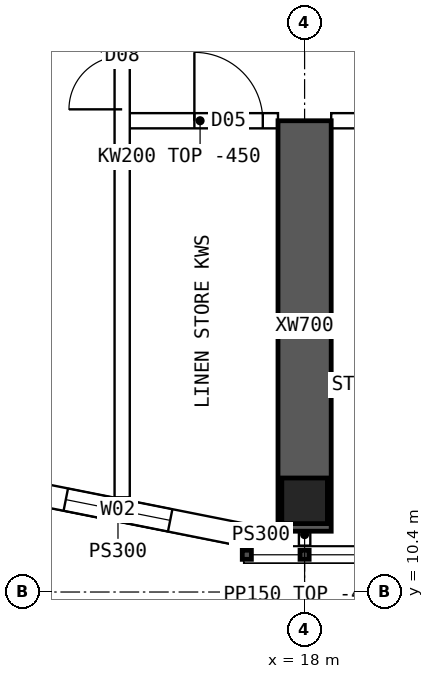
"""IFC4 building model, lengths in metres.
Left out: names, types, materials, properties, quantities, classifications, styles, units other than length and angle.
Written with IfcOpenShell. Run it as: python <this file> out.ifc"""

import sys

from ifc_helpers import new_model, si_unit, direction, frame, frame_2d, origin, origin_2d, place, context, subcontext, project, spatial, polyline, rectangle, hollow_rectangle, outline, extrude, element, fill, save


model = new_model("IFC4")
c1 = context("Model", 3, precision=1e-05, world=origin(), true_north=direction((0.0, 1.0)))
c2 = subcontext(c1, "Body", "Model", "MODEL_VIEW")
j1 = project(units=[si_unit("LENGTHUNIT", "METRE"), si_unit("PLANEANGLEUNIT", "RADIAN")], contexts=[c1])
p1 = place(None, origin())
s1 = spatial("IfcSite", under=j1, at=p1, CompositionType="ELEMENT")
p2 = place(p1, origin())
s2 = spatial("IfcBuilding", under=s1, at=p2, CompositionType="ELEMENT")
p3 = place(p2, frame((0.0, 0.0, 227.8)))
s3 = spatial("IfcBuildingStorey", under=s2, at=p3, CompositionType="ELEMENT", Elevation=227.8)
p4 = place(p3, frame((18.0, 11.6, 0.0), z_axis=(0.0, 0.0, 1.0), x_axis=(1.0, 0.0, 0.0)))
e1 = element("IfcColumn", 1, at=p4, inside=s3, PredefinedType="COLUMN", context=c2, shape_type="SweptSolid", body=[
    extrude(hollow_rectangle(XDim=0.6, YDim=0.6, WallThickness=0.06, at=origin_2d()), origin(), (0.0, 0.0, 1.0), 3.75),
])
p5 = place(p3, frame((18.0, 11.2, 0.0), z_axis=(0.0, 0.0, 1.0), x_axis=(0.0, 1.0, 0.0)))
e2 = element("IfcWall", 2, at=p5, inside=s3, PredefinedType="SHEAR", context=c2, shape_type="SweptSolid", body=[
    extrude(rectangle(XDim=5.4, YDim=0.7, at=frame_2d((2.7, 0.0))), origin(), (0.0, 0.0, 1.0), 3.75),
])
p6 = place(p3, frame((13.89, 11.808, 0.0), z_axis=(0.0, 0.0, 1.0), x_axis=(0.98078325777, -0.195100490205, 0.0)))
e3 = element("IfcWall", 3, at=p6, inside=s3, PredefinedType="SOLIDWALL", context=c2, shape_type="SweptSolid", body=[
    extrude(outline(polyline([(-0.03, -0.15), (3.405, -0.15), (3.345, 0.15), (0.03, 0.15), (-0.03, -0.15)])), origin(), (0.0, 0.0, 1.0), 3.3),
])
p7 = place(p6, frame((0.988, 0.0, 0.9)))
e4 = element("IfcOpeningElement", 4, at=p7, cuts=e3, PredefinedType="OPENING", context=c2, shape_type="SweptSolid", body=[
    extrude(rectangle(XDim=1.4, YDim=1.8, at=frame_2d((0.7, 0.9))), frame((0.0, 0.16, 0.0), z_axis=(0.0, -1.0, 0.0), x_axis=(1.0, 0.0, 0.0)), (0.0, 0.0, 1.0), 0.32),
])
p8 = place(p3, frame((17.2, 11.15, 0.0), z_axis=(0.0, 0.0, 1.0), x_axis=(1.0, 0.0, 0.0)))
e5 = element("IfcWall", 5, at=p8, inside=s3, PredefinedType="SOLIDWALL", context=c2, shape_type="SweptSolid", body=[
    extrude(rectangle(XDim=0.45, YDim=0.3, at=frame_2d((0.225, 0.0))), origin(), (0.0, 0.0, 1.0), 3.3),
])
p9 = place(p3, frame((15.6, 16.6, 0.0), z_axis=(0.0, 0.0, 1.0), x_axis=(1.0, 0.0, 0.0)))
e6 = element("IfcWall", 6, at=p9, inside=s3, PredefinedType="SOLIDWALL", context=c2, shape_type="SweptSolid", body=[
    extrude(rectangle(XDim=2.05, YDim=0.2, at=frame_2d((1.025, 0.0))), origin(), (0.0, 0.0, 1.0), 3.3),
])
p10 = place(p9, frame((0.95, 0.0, 0.0)))
e7 = element("IfcOpeningElement", 7, at=p10, cuts=e6, PredefinedType="OPENING", context=c2, shape_type="SweptSolid", body=[
    extrude(rectangle(XDim=0.9, YDim=2.1, at=frame_2d((0.45, 1.05))), frame((0.0, 0.11, 0.0), z_axis=(0.0, -1.0, 0.0), x_axis=(1.0, 0.0, 0.0)), (0.0, 0.0, 1.0), 0.22),
])
p11 = place(p3, frame((18.35, 16.6, 0.0), z_axis=(0.0, 0.0, 1.0), x_axis=(1.0, 0.0, 0.0)))
e8 = element("IfcWall", 8, at=p11, inside=s3, PredefinedType="SOLIDWALL", context=c2, shape_type="SweptSolid", body=[
    extrude(outline(polyline([(0.0, 0.0), (5.3, 0.0), (5.3, 2.9), (0.0, 2.9), (0.0, 0.0)])), frame((0.0, 0.1, 0.0), z_axis=(0.0, -1.0, 0.0), x_axis=(1.0, 0.0, 0.0)), (0.0, 0.0, 1.0), 0.2),
])
p12 = place(p11, frame((2.3, 0.0, 0.0)))
e9 = element("IfcOpeningElement", 9, at=p12, cuts=e8, PredefinedType="OPENING", context=c2, shape_type="SweptSolid", body=[
    extrude(rectangle(XDim=0.9, YDim=2.1, at=frame_2d((0.45, 1.05))), frame((0.0, 0.11, 0.0), z_axis=(0.0, -1.0, 0.0), x_axis=(1.0, 0.0, 0.0)), (0.0, 0.0, 1.0), 0.22),
])
p13 = place(p3, frame((15.6, 11.646, 0.0), z_axis=(0.0, 0.0, 1.0), x_axis=(0.0, 1.0, 0.0)))
e10 = element("IfcWall", 10, at=p13, inside=s3, PredefinedType="SOLIDWALL", context=c2, shape_type="SweptSolid", body=[
    extrude(rectangle(XDim=40.708, YDim=0.2, at=frame_2d((20.354, 0.0))), origin(), (0.0, 0.0, 1.0), 3.3),
])
p14 = place(p13, frame((13.434, 0.0, 0.0)))
e11 = element("IfcOpeningElement", 11, at=p14, cuts=e10, PredefinedType="OPENING", context=c2, shape_type="SweptSolid", body=[
    extrude(rectangle(XDim=1.2, YDim=2.1, at=frame_2d((0.6, 1.05))), frame((0.0, 0.11, 0.0), z_axis=(0.0, -1.0, 0.0), x_axis=(1.0, 0.0, 0.0)), (0.0, 0.0, 1.0), 0.22),
])
p15 = place(p13, frame((26.074, 0.0, 0.0)))
e12 = element("IfcOpeningElement", 12, at=p15, cuts=e10, PredefinedType="OPENING", context=c2, shape_type="SweptSolid", body=[
    extrude(rectangle(XDim=1.2, YDim=2.1, at=frame_2d((0.6, 1.05))), frame((0.0, 0.11, 0.0), z_axis=(0.0, -1.0, 0.0), x_axis=(1.0, 0.0, 0.0)), (0.0, 0.0, 1.0), 0.22),
])
p16 = place(p13, frame((5.104, 0.0, 0.0)))
e13 = element("IfcOpeningElement", 13, at=p16, cuts=e10, PredefinedType="OPENING", context=c2, shape_type="SweptSolid", body=[
    extrude(rectangle(XDim=1.4, YDim=2.1, at=frame_2d((0.7, 1.05))), frame((0.0, 0.11, 0.0), z_axis=(0.0, -1.0, 0.0), x_axis=(1.0, 0.0, 0.0)), (0.0, 0.0, 1.0), 0.22),
])
p17 = place(p13, frame((34.104, 0.0, 0.0)))
e14 = element("IfcOpeningElement", 14, at=p17, cuts=e10, PredefinedType="OPENING", context=c2, shape_type="SweptSolid", body=[
    extrude(rectangle(XDim=1.4, YDim=2.1, at=frame_2d((0.7, 1.05))), frame((0.0, 0.11, 0.0), z_axis=(0.0, -1.0, 0.0), x_axis=(1.0, 0.0, 0.0)), (0.0, 0.0, 1.0), 0.22),
])
p18 = place(p3, frame((18.0, 11.3, 0.0), z_axis=(0.0, 0.0, 1.0), x_axis=(0.0, -1.0, 0.0)))
e15 = element("IfcWall", 15, at=p18, inside=s3, PredefinedType="PARTITIONING", context=c2, shape_type="SweptSolid", body=[
    extrude(rectangle(XDim=0.29, YDim=0.15, at=frame_2d((0.145, 0.0))), origin(), (0.0, 0.0, 1.0), 3.3),
])
p19 = place(p7, origin())
e16 = element("IfcWindow", 16, at=p19, inside=s3, PartitioningType="SINGLE_PANEL", PredefinedType="WINDOW", context=c2, shape_type="SweptSolid", body=[
    extrude(rectangle(XDim=1.4, YDim=1.8, at=frame_2d((0.7, 0.9))), frame((0.0, 0.03, 0.0), z_axis=(0.0, -1.0, 0.0), x_axis=(1.0, 0.0, 0.0)), (0.0, 0.0, 1.0), 0.06),
])
fill(e4, e16)
p20 = place(p16, origin())
e17 = element("IfcDoor", 17, at=p20, inside=s3, OperationType="DOUBLE_DOOR_SINGLE_SWING", PredefinedType="DOOR", context=c2, shape_type="SweptSolid", body=[
    extrude(rectangle(XDim=1.4, YDim=2.1, at=frame_2d((0.7, 1.05))), frame((0.0, 0.025, 0.0), z_axis=(0.0, -1.0, 0.0), x_axis=(1.0, 0.0, 0.0)), (0.0, 0.0, 1.0), 0.05),
])
fill(e13, e17)
p21 = place(p10, origin())
e18 = element("IfcDoor", 18, at=p21, inside=s3, OperationType="SINGLE_SWING_LEFT", PredefinedType="DOOR", context=c2, shape_type="SweptSolid", body=[
    extrude(rectangle(XDim=0.9, YDim=2.1, at=frame_2d((0.45, 1.05))), frame((0.0, 0.025, 0.0), z_axis=(0.0, -1.0, 0.0), x_axis=(1.0, 0.0, 0.0)), (0.0, 0.0, 1.0), 0.05),
])
fill(e7, e18)
save(model, sys.argv[1])
